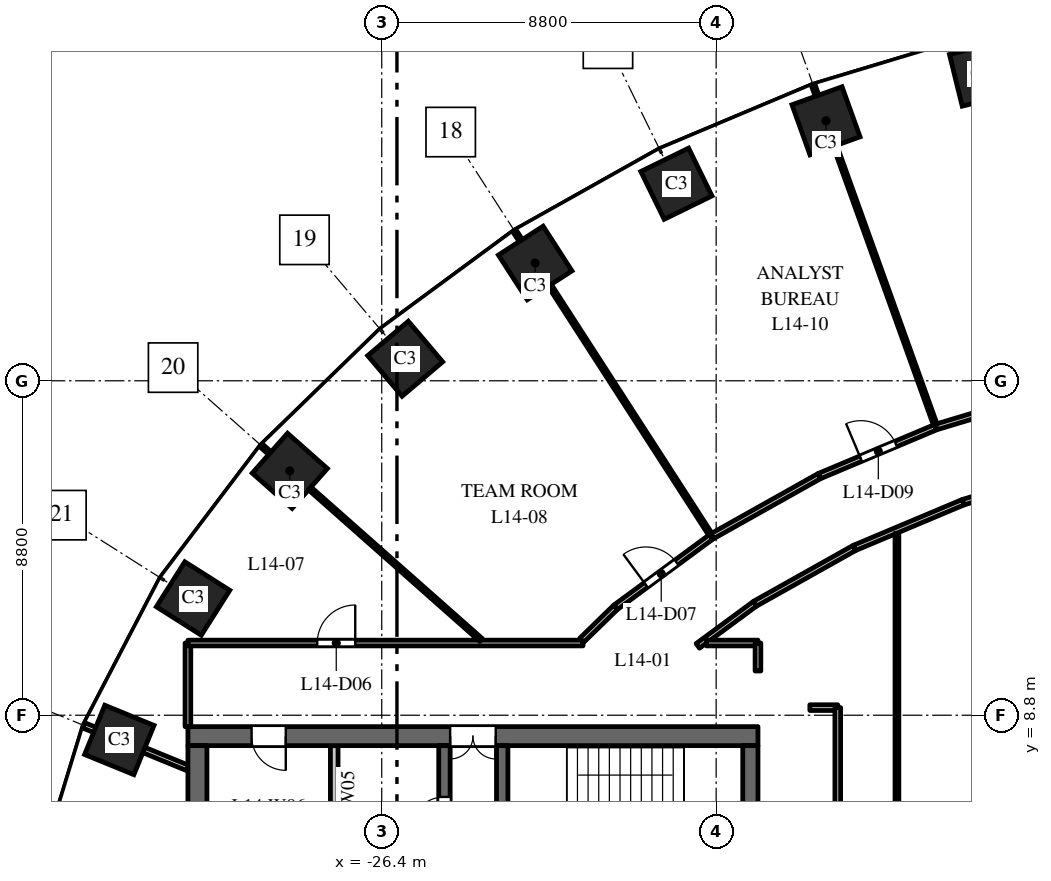
"""IFC4 building model, lengths in metres.
Left out: names, types, materials, properties, quantities, classifications, styles, units other than length and angle.
Written with IfcOpenShell. Run it as: python <this file> out.ifc"""

import sys

from ifc_helpers import new_model, si_unit, direction, frame, frame_2d, origin, origin_2d, place, context, subcontext, project, spatial, rectangle, extrude, element, fill, save


model = new_model("IFC4")
c1 = context("Model", 3, precision=1e-05, world=origin(), true_north=direction((0.0, 1.0)))
c2 = subcontext(c1, "Body", "Model", "MODEL_VIEW")
j1 = project(units=[si_unit("LENGTHUNIT", "METRE"), si_unit("PLANEANGLEUNIT", "RADIAN")], contexts=[c1])
p1 = place(None, origin())
s1 = spatial("IfcSite", under=j1, at=p1, CompositionType="ELEMENT")
p2 = place(p1, origin())
s2 = spatial("IfcBuilding", under=s1, at=p2, CompositionType="ELEMENT")
p3 = place(p2, frame((0.0, 0.0, 66.5)))
s3 = spatial("IfcBuildingStorey", under=s2, at=p3, CompositionType="ELEMENT", Elevation=66.5)
for number, where, z_axis, x_axis in (
    (1, (-10.613, 25.674, 0.0), (0.0, 0.0, 1.0), (-0.971, -0.24, 0.0)),
    (2, (-14.709, 24.441, 0.0), (0.0, 0.0, 1.0), (-0.941, -0.338, 0.0)),
    (3, (-18.646, 22.785, 0.0), (0.0, 0.0, 1.0), (-0.898, -0.439, 0.0)),
    (4, (-22.362, 20.7, 0.0), (0.0, 0.0, 1.0), (-0.84, -0.542, 0.0)),
    (5, (-25.783, 18.18, 0.0), (0.0, 0.0, 1.0), (-0.763, -0.646, 0.0)),
    (6, (-28.819, 15.23, 0.0), (0.0, 0.0, 1.0), (-0.663, -0.749, 0.0)),
    (7, (-31.365, 11.871, 0.0), (0.0, 0.0, 1.0), (-0.535, -0.845, 0.0)),
    (8, (-33.305, 8.149, 0.0), (0.0, 0.0, 1.0), (-0.379, -0.925, 0.0)),
):
    element("IfcColumn", number, at=place(p3, frame(where, z_axis=z_axis, x_axis=x_axis)), inside=s3, PredefinedType="COLUMN", context=c2, shape_type="SweptSolid", body=[
        extrude(rectangle(XDim=1.4, YDim=1.4, at=origin_2d()), origin(), (0.0, 0.0, 1.0), 4.0),
    ])
p4 = place(p3, frame((-16.5, 8.25, 0.0), z_axis=(0.0, 0.0, 1.0), x_axis=(-1.0, 0.0, 0.0)))
e9 = element("IfcWall", 9, at=p4, inside=s3, PredefinedType="SHEAR", context=c2, shape_type="SweptSolid", body=[
    extrude(rectangle(XDim=15.0, YDim=0.5, at=frame_2d((7.5, 0.0))), origin(), (0.0, 0.0, 1.0), 3.7),
])
p5 = place(p4, frame((6.9, 0.0, 0.0)))
e10 = element("IfcOpeningElement", 10, at=p5, cuts=e9, PredefinedType="OPENING", context=c2, shape_type="SweptSolid", body=[
    extrude(rectangle(XDim=1.2, YDim=2.1, at=frame_2d((0.6, 1.05))), frame((0.0, 0.26, 0.0), z_axis=(0.0, -1.0, 0.0), x_axis=(1.0, 0.0, 0.0)), (0.0, 0.0, 1.0), 0.52),
])
p6 = place(p4, frame((12.425, 0.0, 0.0)))
e11 = element("IfcOpeningElement", 11, at=p6, cuts=e9, PredefinedType="OPENING", context=c2, shape_type="SweptSolid", body=[
    extrude(rectangle(XDim=0.9, YDim=2.1, at=frame_2d((0.45, 1.05))), frame((0.0, 0.26, 0.0), z_axis=(0.0, -1.0, 0.0), x_axis=(1.0, 0.0, 0.0)), (0.0, 0.0, 1.0), 0.52),
])
p7 = place(p3, frame((-24.75, -8.0, 0.0), z_axis=(0.0, 0.0, 1.0), x_axis=(0.0, 1.0, 0.0)))
e12 = element("IfcWall", 12, at=p7, inside=s3, PredefinedType="SHEAR", context=c2, shape_type="SweptSolid", body=[
    extrude(rectangle(XDim=16.0, YDim=0.3, at=frame_2d((8.0, 0.0))), origin(), (0.0, 0.0, 1.0), 3.7),
])
p8 = place(p7, frame((4.425, 0.0, 0.0)))
e13 = element("IfcOpeningElement", 13, at=p8, cuts=e12, PredefinedType="OPENING", context=c2, shape_type="SweptSolid", body=[
    extrude(rectangle(XDim=1.1, YDim=2.1, at=frame_2d((0.55, 1.05))), frame((0.0, 0.16, 0.0), z_axis=(0.0, -1.0, 0.0), x_axis=(1.0, 0.0, 0.0)), (0.0, 0.0, 1.0), 0.32),
])
p9 = place(p7, frame((7.45, 0.0, 0.0)))
e14 = element("IfcOpeningElement", 14, at=p9, cuts=e12, PredefinedType="OPENING", context=c2, shape_type="SweptSolid", body=[
    extrude(rectangle(XDim=1.1, YDim=2.1, at=frame_2d((0.55, 1.05))), frame((0.0, 0.16, 0.0), z_axis=(0.0, -1.0, 0.0), x_axis=(1.0, 0.0, 0.0)), (0.0, 0.0, 1.0), 0.32),
])
p10 = place(p7, frame((10.425, 0.0, 0.0)))
e15 = element("IfcOpeningElement", 15, at=p10, cuts=e12, PredefinedType="OPENING", context=c2, shape_type="SweptSolid", body=[
    extrude(rectangle(XDim=1.2, YDim=2.1, at=frame_2d((0.6, 1.05))), frame((0.0, 0.16, 0.0), z_axis=(0.0, -1.0, 0.0), x_axis=(1.0, 0.0, 0.0)), (0.0, 0.0, 1.0), 0.32),
])
p11 = place(p7, frame((13.75, 0.0, 0.0)))
e16 = element("IfcOpeningElement", 16, at=p11, cuts=e12, PredefinedType="OPENING", context=c2, shape_type="SweptSolid", body=[
    extrude(rectangle(XDim=0.9, YDim=2.1, at=frame_2d((0.45, 1.05))), frame((0.0, 0.16, 0.0), z_axis=(0.0, -1.0, 0.0), x_axis=(1.0, 0.0, 0.0)), (0.0, 0.0, 1.0), 0.32),
])
p12 = place(p7, frame((1.975, 0.0, 0.0)))
e17 = element("IfcOpeningElement", 17, at=p12, cuts=e12, PredefinedType="OPENING", context=c2, shape_type="SweptSolid", body=[
    extrude(rectangle(XDim=0.9, YDim=2.1, at=frame_2d((0.45, 1.05))), frame((0.0, 0.16, 0.0), z_axis=(0.0, -1.0, 0.0), x_axis=(1.0, 0.0, 0.0)), (0.0, 0.0, 1.0), 0.32),
])
p13 = place(p7, frame((0.35, 0.0, 0.0)))
e18 = element("IfcOpeningElement", 18, at=p13, cuts=e12, PredefinedType="OPENING", context=c2, shape_type="SweptSolid", body=[
    extrude(rectangle(XDim=0.9, YDim=2.1, at=frame_2d((0.45, 1.05))), frame((0.0, 0.16, 0.0), z_axis=(0.0, -1.0, 0.0), x_axis=(1.0, 0.0, 0.0)), (0.0, 0.0, 1.0), 0.32),
])
p14 = place(p3, frame((-16.7, -8.0, 0.0), z_axis=(0.0, 0.0, 1.0), x_axis=(0.0, 1.0, 0.0)))
e19 = element("IfcWall", 19, at=p14, inside=s3, PredefinedType="SHEAR", context=c2, shape_type="SweptSolid", body=[
    extrude(rectangle(XDim=16.0, YDim=0.4, at=frame_2d((8.0, 0.0))), origin(), (0.0, 0.0, 1.0), 3.7),
])
p15 = place(p3, frame((-31.25, -8.0, 0.0), z_axis=(0.0, 0.0, 1.0), x_axis=(0.0, 1.0, 0.0)))
e20 = element("IfcWall", 20, at=p15, inside=s3, PredefinedType="SHEAR", context=c2, shape_type="SweptSolid", body=[
    extrude(rectangle(XDim=16.0, YDim=0.5, at=frame_2d((8.0, 0.0))), origin(), (0.0, 0.0, 1.0), 3.7),
])
p16 = place(p3, frame((-27.65, 4.75, 0.0), z_axis=(0.0, 0.0, 1.0), x_axis=(0.0, 1.0, 0.0)))
e21 = element("IfcWall", 21, at=p16, inside=s3, PredefinedType="PARTITIONING", context=c2, shape_type="SweptSolid", body=[
    extrude(rectangle(XDim=3.25, YDim=0.2, at=frame_2d((1.625, 0.0))), origin(), (0.0, 0.0, 1.0), 3.7),
])
p17 = place(p3, frame((-23.23, 2.25, 0.0), z_axis=(0.0, 0.0, 1.0), x_axis=(0.0, 1.0, 0.0)))
e22 = element("IfcWall", 22, at=p17, inside=s3, PredefinedType="SHEAR", context=c2, shape_type="SweptSolid", body=[
    extrude(rectangle(XDim=5.75, YDim=0.3, at=frame_2d((2.875, 0.0))), origin(), (0.0, 0.0, 1.0), 3.7),
])
p18 = place(p17, frame((0.6, 0.0, 0.0)))
e23 = element("IfcOpeningElement", 23, at=p18, cuts=e22, PredefinedType="OPENING", context=c2, shape_type="SweptSolid", body=[
    extrude(rectangle(XDim=1.0, YDim=2.1, at=frame_2d((0.5, 1.05))), frame((0.0, 0.16, 0.0), z_axis=(0.0, -1.0, 0.0), x_axis=(1.0, 0.0, 0.0)), (0.0, 0.0, 1.0), 0.32),
])
p19 = place(p3, frame((-34.234, 8.53, 0.0), z_axis=(0.0, 0.0, 1.0), x_axis=(0.925344112436, -0.379128307542, 0.0)))
e24 = element("IfcWall", 24, at=p19, inside=s3, PredefinedType="PARTITIONING", context=c2, shape_type="SweptSolid", body=[
    extrude(rectangle(XDim=2.954, YDim=0.15, at=frame_2d((1.477, 0.0))), origin(), (0.0, 0.0, 1.0), 2.85),
])
p20 = place(p3, frame((-31.5, 8.5, 0.0), z_axis=(0.0, 0.0, 1.0), x_axis=(0.0, 1.0, 0.0)))
e25 = element("IfcWall", 25, at=p20, inside=s3, PredefinedType="PARTITIONING", context=c2, shape_type="SweptSolid", body=[
    extrude(rectangle(XDim=2.2, YDim=0.15, at=frame_2d((1.1, 0.0))), origin(), (0.0, 0.0, 1.0), 3.7),
])
p21 = place(p3, frame((-31.5, 10.7, 0.0), z_axis=(0.0, 0.0, 1.0), x_axis=(1.0, 0.0, 0.0)))
e26 = element("IfcWall", 26, at=p21, inside=s3, PredefinedType="PARTITIONING", context=c2, shape_type="SweptSolid", body=[
    extrude(rectangle(XDim=10.396, YDim=0.15, at=frame_2d((5.198, 0.0))), origin(), (0.0, 0.0, 1.0), 3.1),
])
p22 = place(p21, frame((3.403, 0.0, 0.0)))
e27 = element("IfcOpeningElement", 27, at=p22, cuts=e26, PredefinedType="OPENING", context=c2, shape_type="SweptSolid", body=[
    extrude(rectangle(XDim=1.0, YDim=2.1, at=frame_2d((0.5, 1.05))), frame((0.0, 0.085, 0.0), z_axis=(0.0, -1.0, 0.0), x_axis=(1.0, 0.0, 0.0)), (0.0, 0.0, 1.0), 0.17),
])
p23 = place(p3, frame((-29.569, 15.895, 0.0), z_axis=(0.0, 0.0, 1.0), x_axis=(0.748985701008, -0.662586160198, 0.0)))
e28 = element("IfcWall", 28, at=p23, inside=s3, PredefinedType="PARTITIONING", context=c2, shape_type="SweptSolid", body=[
    extrude(rectangle(XDim=7.723, YDim=0.1, at=frame_2d((3.861, 0.0))), origin(), (0.0, 0.0, 1.0), 2.85),
])
p24 = place(p3, frame((-22.905, 21.542, 0.0), z_axis=(0.0, 0.0, 1.0), x_axis=(0.542244314938, -0.840220865557, 0.0)))
e29 = element("IfcWall", 29, at=p24, inside=s3, PredefinedType="PARTITIONING", context=c2, shape_type="SweptSolid", body=[
    extrude(rectangle(XDim=9.564, YDim=0.1, at=frame_2d((4.782, 0.0))), origin(), (0.0, 0.0, 1.0), 2.85),
])
p25 = place(p3, frame((-21.135, 10.775, 0.0), z_axis=(0.0, 0.0, 1.0), x_axis=(0.717043956417, 0.697027951065, 0.0)))
e30 = element("IfcWall", 30, at=p25, inside=s3, PredefinedType="PARTITIONING", context=c2, shape_type="SweptSolid", body=[
    extrude(rectangle(XDim=1.244, YDim=0.15, at=frame_2d((0.622, 0.0))), origin(), (0.0, 0.0, 1.0), 3.7),
])
p26 = place(p3, frame((-20.243, 11.642, 0.0), z_axis=(0.0, 0.0, 1.0), x_axis=(0.805148342369, 0.593073475027, 0.0)))
e31 = element("IfcWall", 31, at=p26, inside=s3, PredefinedType="PARTITIONING", context=c2, shape_type="SweptSolid", body=[
    extrude(rectangle(XDim=3.117, YDim=0.15, at=frame_2d((1.559, 0.0))), origin(), (0.0, 0.0, 1.0), 2.75),
])
p27 = place(p26, frame((0.988, 0.0, 0.0)))
e32 = element("IfcOpeningElement", 32, at=p27, cuts=e31, PredefinedType="OPENING", context=c2, shape_type="SweptSolid", body=[
    extrude(rectangle(XDim=1.0, YDim=2.1, at=frame_2d((0.5, 1.05))), frame((0.0, 0.085, 0.0), z_axis=(0.0, -1.0, 0.0), x_axis=(1.0, 0.0, 0.0)), (0.0, 0.0, 1.0), 0.17),
])
p28 = place(p3, frame((-18.083, 10.625, 0.0), z_axis=(0.0, 0.0, 1.0), x_axis=(0.805150898842, 0.593070004379, 0.0)))
e33 = element("IfcWall", 33, at=p28, inside=s3, PredefinedType="PARTITIONING", context=c2, shape_type="SweptSolid", body=[
    extrude(rectangle(XDim=1.872, YDim=0.15, at=frame_2d((0.936, 0.0))), origin(), (0.0, 0.0, 1.0), 2.75),
])
p29 = place(p3, frame((-17.855, 10.7, 0.0), z_axis=(0.0, 0.0, 1.0), x_axis=(1.0, 0.0, 0.0)))
e34 = element("IfcWall", 34, at=p29, inside=s3, PredefinedType="PARTITIONING", context=c2, shape_type="SweptSolid", body=[
    extrude(rectangle(XDim=1.355, YDim=0.15, at=frame_2d((0.677, 0.0))), origin(), (0.0, 0.0, 1.0), 3.7),
])
p30 = place(p3, frame((-17.699, 13.513, 0.0), z_axis=(0.0, 0.0, 1.0), x_axis=(0.872072163686, 0.489377299559, 0.0)))
e35 = element("IfcWall", 35, at=p30, inside=s3, PredefinedType="PARTITIONING", context=c2, shape_type="SweptSolid", body=[
    extrude(rectangle(XDim=3.227, YDim=0.15, at=frame_2d((1.613, 0.0))), origin(), (0.0, 0.0, 1.0), 3.7),
])
p31 = place(p3, frame((-16.576, 11.735, 0.0), z_axis=(0.0, 0.0, 1.0), x_axis=(0.872164226045, 0.489213207924, 0.0)))
e36 = element("IfcWall", 36, at=p31, inside=s3, PredefinedType="PARTITIONING", context=c2, shape_type="SweptSolid", body=[
    extrude(rectangle(XDim=2.998, YDim=0.15, at=frame_2d((1.499, 0.0))), origin(), (0.0, 0.0, 1.0), 2.75),
])
p32 = place(p3, frame((-16.5, 9.964, 0.0), z_axis=(0.0, 0.0, 1.0), x_axis=(0.0, 1.0, 0.0)))
e37 = element("IfcWall", 37, at=p32, inside=s3, PredefinedType="PARTITIONING", context=c2, shape_type="SweptSolid", body=[
    extrude(rectangle(XDim=0.736, YDim=0.15, at=frame_2d((0.368, 0.0))), origin(), (0.0, 0.0, 1.0), 3.7),
])
p33 = place(p3, frame((-15.134, 9.0, 0.0), z_axis=(0.0, 0.0, 1.0), x_axis=(1.0, 0.0, 0.0)))
e38 = element("IfcWall", 38, at=p33, inside=s3, PredefinedType="PARTITIONING", context=c2, shape_type="SweptSolid", body=[
    extrude(rectangle(XDim=0.734, YDim=0.15, at=frame_2d((0.367, 0.0))), origin(), (0.0, 0.0, 1.0), 3.7),
])
p34 = place(p3, frame((-15.048, 25.383, 0.0), z_axis=(0.0, 0.0, 1.0), x_axis=(0.338338680362, -0.941024408488, 0.0)))
e39 = element("IfcWall", 39, at=p34, inside=s3, PredefinedType="PARTITIONING", context=c2, shape_type="SweptSolid", body=[
    extrude(rectangle(XDim=9.559, YDim=0.1, at=frame_2d((4.779, 0.0))), origin(), (0.0, 0.0, 1.0), 2.85),
])
p35 = place(p3, frame((-14.885, 15.092, 0.0), z_axis=(0.0, 0.0, 1.0), x_axis=(0.921844706698, 0.387559462189, 0.0)))
e40 = element("IfcWall", 40, at=p35, inside=s3, PredefinedType="PARTITIONING", context=c2, shape_type="SweptSolid", body=[
    extrude(rectangle(XDim=3.313, YDim=0.15, at=frame_2d((1.656, 0.0))), origin(), (0.0, 0.0, 1.0), 2.85),
])
p36 = place(p35, frame((1.184, 0.0, 0.0)))
e41 = element("IfcOpeningElement", 41, at=p36, cuts=e40, PredefinedType="OPENING", context=c2, shape_type="SweptSolid", body=[
    extrude(rectangle(XDim=1.0, YDim=2.1, at=frame_2d((0.5, 1.05))), frame((0.0, 0.085, 0.0), z_axis=(0.0, -1.0, 0.0), x_axis=(1.0, 0.0, 0.0)), (0.0, 0.0, 1.0), 0.17),
])
p37 = place(p3, frame((-14.4, -9.0, 0.0), z_axis=(0.0, 0.0, 1.0), x_axis=(0.0, 1.0, 0.0)))
e42 = element("IfcWall", 42, at=p37, inside=s3, PredefinedType="PARTITIONING", context=c2, shape_type="SweptSolid", body=[
    extrude(rectangle(XDim=18.0, YDim=0.15, at=frame_2d((9.0, 0.0))), origin(), (0.0, 0.0, 1.0), 3.7),
])
p38 = place(p37, frame((8.4, 0.0, 0.0)))
e43 = element("IfcOpeningElement", 43, at=p38, cuts=e42, PredefinedType="OPENING", context=c2, shape_type="SweptSolid", body=[
    extrude(rectangle(XDim=1.0, YDim=2.1, at=frame_2d((0.5, 1.05))), frame((0.0, 0.085, 0.0), z_axis=(0.0, -1.0, 0.0), x_axis=(1.0, 0.0, 0.0)), (0.0, 0.0, 1.0), 0.17),
])
p39 = place(p3, frame((-13.961, 13.202, 0.0), z_axis=(0.0, 0.0, 1.0), x_axis=(0.921753827375, 0.387775555857, 0.0)))
e44 = element("IfcWall", 44, at=p39, inside=s3, PredefinedType="PARTITIONING", context=c2, shape_type="SweptSolid", body=[
    extrude(rectangle(XDim=3.103, YDim=0.15, at=frame_2d((1.551, 0.0))), origin(), (0.0, 0.0, 1.0), 2.85),
])
p40 = place(p3, frame((-12.843, -13.587, 0.0), z_axis=(0.0, 0.0, 1.0), x_axis=(0.0, 1.0, 0.0)))
e45 = element("IfcWall", 45, at=p40, inside=s3, PredefinedType="PARTITIONING", context=c2, shape_type="SweptSolid", body=[
    extrude(rectangle(XDim=27.174, YDim=0.1, at=frame_2d((13.587, 0.0))), origin(), (0.0, 0.0, 1.0), 2.75),
])
p41 = place(p3, frame((-11.812, 16.384, 0.0), z_axis=(0.0, 0.0, 1.0), x_axis=(0.95754884035, 0.28827108482, 0.0)))
e46 = element("IfcWall", 46, at=p41, inside=s3, PredefinedType="PARTITIONING", context=c2, shape_type="SweptSolid", body=[
    extrude(rectangle(XDim=3.396, YDim=0.15, at=frame_2d((1.698, 0.0))), origin(), (0.0, 0.0, 1.0), 3.7),
])
p42 = place(p3, frame((-11.101, 14.405, 0.0), z_axis=(0.0, 0.0, 1.0), x_axis=(0.957612601062, 0.28805920622, 0.0)))
e47 = element("IfcWall", 47, at=p42, inside=s3, PredefinedType="PARTITIONING", context=c2, shape_type="SweptSolid", body=[
    extrude(rectangle(XDim=3.18, YDim=0.15, at=frame_2d((1.59, 0.0))), origin(), (0.0, 0.0, 1.0), 3.7),
])
p43 = place(p42, frame((1.15, 0.0, 0.0)))
e48 = element("IfcOpeningElement", 48, at=p43, cuts=e47, PredefinedType="OPENING", context=c2, shape_type="SweptSolid", body=[
    extrude(rectangle(XDim=1.0, YDim=2.1, at=frame_2d((0.5, 1.05))), frame((0.0, 0.085, 0.0), z_axis=(0.0, -1.0, 0.0), x_axis=(1.0, 0.0, 0.0)), (0.0, 0.0, 1.0), 0.17),
])
p44 = place(p5, origin())
e49 = element("IfcDoor", 49, at=p44, inside=s3, OperationType="DOUBLE_DOOR_DOUBLE_SWING", PredefinedType="DOOR", context=c2, shape_type="SweptSolid", body=[
    extrude(rectangle(XDim=1.2, YDim=2.1, at=frame_2d((0.6, 1.05))), frame((0.0, 0.025, 0.0), z_axis=(0.0, -1.0, 0.0), x_axis=(1.0, 0.0, 0.0)), (0.0, 0.0, 1.0), 0.05),
])
fill(e10, e49)
p45 = place(p11, origin())
e50 = element("IfcDoor", 50, at=p45, inside=s3, OperationType="SINGLE_SWING_RIGHT", PredefinedType="DOOR", context=c2, shape_type="SweptSolid", body=[
    extrude(rectangle(XDim=0.9, YDim=2.1, at=frame_2d((0.45, 1.05))), frame((0.0, 0.025, 0.0), z_axis=(0.0, -1.0, 0.0), x_axis=(1.0, 0.0, 0.0)), (0.0, 0.0, 1.0), 0.05),
])
fill(e16, e50)
p46 = place(p6, origin())
e51 = element("IfcDoor", 51, at=p46, inside=s3, OperationType="SINGLE_SWING_RIGHT", PredefinedType="DOOR", context=c2, shape_type="SweptSolid", body=[
    extrude(rectangle(XDim=0.9, YDim=2.1, at=frame_2d((0.45, 1.05))), frame((0.0, 0.025, 0.0), z_axis=(0.0, -1.0, 0.0), x_axis=(1.0, 0.0, 0.0)), (0.0, 0.0, 1.0), 0.05),
])
fill(e11, e51)
p47 = place(p22, origin())
e52 = element("IfcDoor", 52, at=p47, inside=s3, OperationType="SINGLE_SWING_RIGHT", PredefinedType="DOOR", context=c2, shape_type="SweptSolid", body=[
    extrude(rectangle(XDim=1.0, YDim=2.1, at=frame_2d((0.5, 1.05))), frame((0.0, 0.025, 0.0), z_axis=(0.0, -1.0, 0.0), x_axis=(1.0, 0.0, 0.0)), (0.0, 0.0, 1.0), 0.05),
])
fill(e27, e52)
p48 = place(p27, origin())
e53 = element("IfcDoor", 53, at=p48, inside=s3, OperationType="SINGLE_SWING_LEFT", PredefinedType="DOOR", context=c2, shape_type="SweptSolid", body=[
    extrude(rectangle(XDim=1.0, YDim=2.1, at=frame_2d((0.5, 1.05))), frame((0.0, 0.025, 0.0), z_axis=(0.0, -1.0, 0.0), x_axis=(1.0, 0.0, 0.0)), (0.0, 0.0, 1.0), 0.05),
])
fill(e32, e53)
p49 = place(p36, origin())
e54 = element("IfcDoor", 54, at=p49, inside=s3, OperationType="SINGLE_SWING_LEFT", PredefinedType="DOOR", context=c2, shape_type="SweptSolid", body=[
    extrude(rectangle(XDim=1.0, YDim=2.1, at=frame_2d((0.5, 1.05))), frame((0.0, 0.025, 0.0), z_axis=(0.0, -1.0, 0.0), x_axis=(1.0, 0.0, 0.0)), (0.0, 0.0, 1.0), 0.05),
])
fill(e41, e54)
save(model, sys.argv[1])
